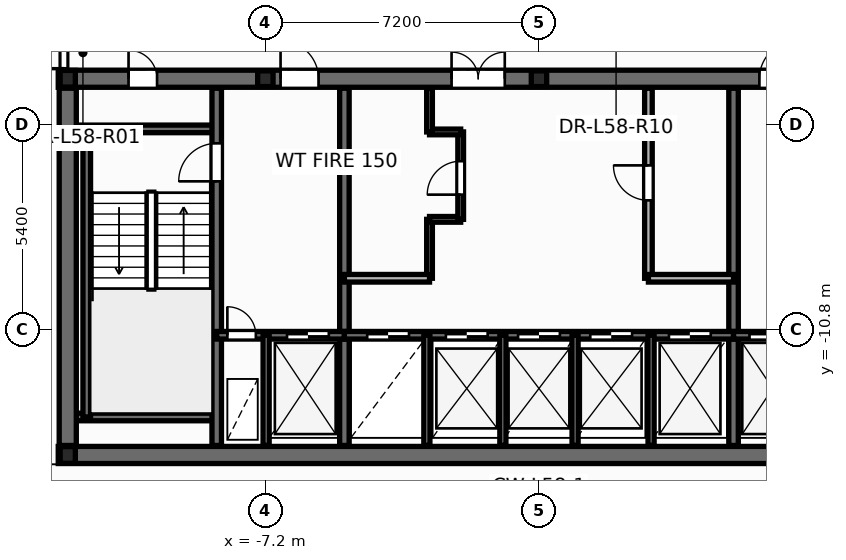
"""IFC4 building model, lengths in metres.
Left out: names, types, materials, properties, quantities, classifications, styles, units other than length and angle.
Written with IfcOpenShell. Run it as: python <this file> out.ifc"""

import sys

from ifc_helpers import new_model, si_unit, direction, frame, frame_2d, origin, origin_2d, place, context, subcontext, project, spatial, rectangle, i_section, extrude, element, fill, save


model = new_model("IFC4")
c1 = context("Model", 3, precision=1e-05, world=origin(), true_north=direction((0.0, 1.0)))
c2 = subcontext(c1, "Body", "Model", "MODEL_VIEW")
j1 = project(units=[si_unit("LENGTHUNIT", "METRE"), si_unit("PLANEANGLEUNIT", "RADIAN")], contexts=[c1])
p1 = place(None, origin())
s1 = spatial("IfcSite", under=j1, at=p1, CompositionType="ELEMENT")
p2 = place(p1, origin())
s2 = spatial("IfcBuilding", under=s1, at=p2, CompositionType="ELEMENT")
p3 = place(p2, frame((0.0, 0.0, 221.7)))
s3 = spatial("IfcBuildingStorey", under=s2, at=p3, CompositionType="ELEMENT", Elevation=221.7)
for number, where, z_axis, x_axis in (
    (1, (-12.4, -14.1, 0.0), (0.0, 0.0, 1.0), (1.0, 0.0, 0.0)),
    (2, (-12.4, -4.2, 0.0), (0.0, 0.0, 1.0), (1.0, 0.0, 0.0)),
):
    element("IfcColumn", number, at=place(p3, frame(where, z_axis=z_axis, x_axis=x_axis)), inside=s3, PredefinedType="COLUMN", context=c2, shape_type="SweptSolid", body=[
        extrude(i_section(OverallWidth=0.4, OverallDepth=0.44, WebThickness=0.028, FlangeThickness=0.04, at=origin_2d()), origin(), (0.0, 0.0, 1.0), 3.6),
    ])
for number, where, z_axis, x_axis in (
    (3, (-7.2, -4.2, 0.0), (0.0, 0.0, 1.0), (1.0, 0.0, 0.0)),
    (4, (0.0, -4.2, 0.0), (0.0, 0.0, 1.0), (1.0, 0.0, 0.0)),
):
    element("IfcColumn", number, at=place(p3, frame(where, z_axis=z_axis, x_axis=x_axis)), inside=s3, PredefinedType="PILASTER", context=c2, shape_type="SweptSolid", body=[
        extrude(i_section(OverallWidth=0.405, OverallDepth=0.414, WebThickness=0.022, FlangeThickness=0.032, at=origin_2d()), origin(), (0.0, 0.0, 1.0), 3.6),
    ])
p4 = place(p3, frame((-2.88, -9.45, 0.0), z_axis=(0.0, 0.0, 1.0), x_axis=(0.0, 1.0, 0.0)))
e5 = element("IfcWall", 5, at=p4, inside=s3, PredefinedType="PARTITIONING", context=c2, shape_type="SweptSolid", body=[
    extrude(rectangle(XDim=1.55, YDim=0.15, at=frame_2d((0.775, 0.0))), origin(), (0.0, 0.0, 1.0), 3.345),
])
p5 = place(p3, frame((-2.88, -7.9, 0.0), z_axis=(0.0, 0.0, 1.0), x_axis=(1.0, 0.0, 0.0)))
e6 = element("IfcWall", 6, at=p5, inside=s3, PredefinedType="PARTITIONING", context=c2, shape_type="SweptSolid", body=[
    extrude(rectangle(XDim=0.82, YDim=0.15, at=frame_2d((0.41, 0.0))), origin(), (0.0, 0.0, 1.0), 3.345),
])
p6 = place(p3, frame((-2.06, -7.9, 0.0), z_axis=(0.0, 0.0, 1.0), x_axis=(0.0, 1.0, 0.0)))
e7 = element("IfcWall", 7, at=p6, inside=s3, PredefinedType="PARTITIONING", context=c2, shape_type="SweptSolid", body=[
    extrude(rectangle(XDim=2.3, YDim=0.15, at=frame_2d((1.15, 0.0))), origin(), (0.0, 0.0, 1.0), 3.345),
])
p7 = place(p6, frame((0.65, 0.0, 0.0)))
e8 = element("IfcOpeningElement", 8, at=p7, cuts=e7, PredefinedType="OPENING", context=c2, shape_type="SweptSolid", body=[
    extrude(rectangle(XDim=0.886, YDim=2.104, at=frame_2d((0.44, 1.052))), frame((0.0, 0.085, 0.0), z_axis=(0.0, -1.0, 0.0), x_axis=(1.0, 0.0, 0.0)), (0.0, 0.0, 1.0), 0.17),
])
p8 = place(p3, frame((-2.88, -5.6, 0.0), z_axis=(0.0, 0.0, 1.0), x_axis=(1.0, 0.0, 0.0)))
e9 = element("IfcWall", 9, at=p8, inside=s3, PredefinedType="PARTITIONING", context=c2, shape_type="SweptSolid", body=[
    extrude(rectangle(XDim=0.82, YDim=0.15, at=frame_2d((0.41, 0.0))), origin(), (0.0, 0.0, 1.0), 3.345),
])
p9 = place(p3, frame((-2.88, -5.6, 0.0), z_axis=(0.0, 0.0, 1.0), x_axis=(0.0, 1.0, 0.0)))
e10 = element("IfcWall", 10, at=p9, inside=s3, PredefinedType="PARTITIONING", context=c2, shape_type="SweptSolid", body=[
    extrude(rectangle(XDim=1.15, YDim=0.15, at=frame_2d((0.575, 0.0))), origin(), (0.0, 0.0, 1.0), 3.345),
])
p10 = place(p3, frame((-12.65, -14.1, 0.0), z_axis=(0.0, 0.0, 1.0), x_axis=(1.0, 0.0, 0.0)))
e11 = element("IfcWall", 11, at=p10, inside=s3, PredefinedType="SHEAR", context=c2, shape_type="SweptSolid", body=[
    extrude(rectangle(XDim=25.3, YDim=0.45, at=frame_2d((12.65, 0.0))), origin(), (0.0, 0.0, 1.0), 3.6),
])
p11 = place(p3, frame((-12.65, -4.2, 0.0), z_axis=(0.0, 0.0, 1.0), x_axis=(1.0, 0.0, 0.0)))
e12 = element("IfcWall", 12, at=p11, inside=s3, PredefinedType="SHEAR", context=c2, shape_type="SweptSolid", body=[
    extrude(rectangle(XDim=25.3, YDim=0.45, at=frame_2d((12.65, 0.0))), origin(), (0.0, 0.0, 1.0), 3.6),
])
p12 = place(p11, frame((1.85, 0.0, 0.0)))
e13 = element("IfcOpeningElement", 13, at=p12, cuts=e12, PredefinedType="OPENING", context=c2, shape_type="SweptSolid", body=[
    extrude(rectangle(XDim=0.756, YDim=2.054, at=frame_2d((0.375, 1.027))), frame((0.0, 0.235, 0.0), z_axis=(0.0, -1.0, 0.0), x_axis=(1.0, 0.0, 0.0)), (0.0, 0.0, 1.0), 0.47),
])
p13 = place(p11, frame((21.85, 0.0, 0.0)))
e14 = element("IfcOpeningElement", 14, at=p13, cuts=e12, PredefinedType="OPENING", context=c2, shape_type="SweptSolid", body=[
    extrude(rectangle(XDim=0.756, YDim=2.054, at=frame_2d((0.375, 1.027))), frame((0.0, 0.235, 0.0), z_axis=(0.0, -1.0, 0.0), x_axis=(1.0, 0.0, 0.0)), (0.0, 0.0, 1.0), 0.47),
])
p14 = place(p11, frame((23.5, 0.0, 0.0)))
e15 = element("IfcOpeningElement", 15, at=p14, cuts=e12, PredefinedType="OPENING", context=c2, shape_type="SweptSolid", body=[
    extrude(rectangle(XDim=0.756, YDim=2.054, at=frame_2d((0.375, 1.027))), frame((0.0, 0.235, 0.0), z_axis=(0.0, -1.0, 0.0), x_axis=(1.0, 0.0, 0.0)), (0.0, 0.0, 1.0), 0.47),
])
p15 = place(p11, frame((5.85, 0.0, 0.0)))
e16 = element("IfcOpeningElement", 16, at=p15, cuts=e12, PredefinedType="OPENING", context=c2, shape_type="SweptSolid", body=[
    extrude(rectangle(XDim=1.006, YDim=2.104, at=frame_2d((0.5, 1.052))), frame((0.0, 0.235, 0.0), z_axis=(0.0, -1.0, 0.0), x_axis=(1.0, 0.0, 0.0)), (0.0, 0.0, 1.0), 0.47),
])
p16 = place(p11, frame((10.35, 0.0, 0.0)))
e17 = element("IfcOpeningElement", 17, at=p16, cuts=e12, PredefinedType="OPENING", context=c2, shape_type="SweptSolid", body=[
    extrude(rectangle(XDim=1.406, YDim=2.154, at=frame_2d((0.7, 1.077))), frame((0.0, 0.235, 0.0), z_axis=(0.0, -1.0, 0.0), x_axis=(1.0, 0.0, 0.0)), (0.0, 0.0, 1.0), 0.47),
])
p17 = place(p11, frame((18.45, 0.0, 0.0)))
e18 = element("IfcOpeningElement", 18, at=p17, cuts=e12, PredefinedType="OPENING", context=c2, shape_type="SweptSolid", body=[
    extrude(rectangle(XDim=1.006, YDim=2.104, at=frame_2d((0.5, 1.052))), frame((0.0, 0.235, 0.0), z_axis=(0.0, -1.0, 0.0), x_axis=(1.0, 0.0, 0.0)), (0.0, 0.0, 1.0), 0.47),
])
for number, where, z_axis, x_axis in (
    (19, (-12.35, -5.52, 0.0), (0.0, 0.0, 1.0), (1.0, 0.0, 0.0)),
    (20, (-12.35, -13.1, 0.0), (0.0, 0.0, 1.0), (1.0, 0.0, 0.0)),
):
    element("IfcWall", number, at=place(p3, frame(where, z_axis=z_axis, x_axis=x_axis)), inside=s3, PredefinedType="SOLIDWALL", context=c2, shape_type="SweptSolid", body=[
        extrude(rectangle(XDim=3.87, YDim=0.2, at=frame_2d((1.935, 0.0))), origin(), (0.0, 0.0, 1.0), 3.6),
    ])
p18 = place(p3, frame((-11.9, -13.1, 0.0), z_axis=(0.0, 0.0, 1.0), x_axis=(0.0, 1.0, 0.0)))
e21 = element("IfcWall", 21, at=p18, inside=s3, PredefinedType="SOLIDWALL", context=c2, shape_type="SweptSolid", body=[
    extrude(rectangle(XDim=7.58, YDim=0.2, at=frame_2d((3.79, 0.0))), origin(), (0.0, 0.0, 1.0), 3.6),
])
p19 = place(p3, frame((-8.48, -13.85, 0.0), z_axis=(0.0, 0.0, 1.0), x_axis=(0.0, 1.0, 0.0)))
e22 = element("IfcWall", 22, at=p19, inside=s3, PredefinedType="SHEAR", context=c2, shape_type="SweptSolid", body=[
    extrude(rectangle(XDim=9.4, YDim=0.25, at=frame_2d((4.7, 0.0))), origin(), (0.0, 0.0, 1.0), 3.6),
])
p20 = place(p19, frame((6.95, 0.0, 0.0)))
e23 = element("IfcOpeningElement", 23, at=p20, cuts=e22, PredefinedType="OPENING", context=c2, shape_type="SweptSolid", body=[
    extrude(rectangle(XDim=1.006, YDim=2.104, at=frame_2d((0.5, 1.052))), frame((0.0, 0.135, 0.0), z_axis=(0.0, -1.0, 0.0), x_axis=(1.0, 0.0, 0.0)), (0.0, 0.0, 1.0), 0.27),
])
for number, where, z_axis, x_axis in (
    (24, (-5.12, -13.85, 0.0), (0.0, 0.0, 1.0), (0.0, 1.0, 0.0)),
    (25, (5.12, -13.85, 0.0), (0.0, 0.0, 1.0), (0.0, 1.0, 0.0)),
):
    element("IfcWall", number, at=place(p3, frame(where, z_axis=z_axis, x_axis=x_axis)), inside=s3, PredefinedType="SHEAR", context=c2, shape_type="SweptSolid", body=[
        extrude(rectangle(XDim=9.4, YDim=0.25, at=frame_2d((4.7, 0.0))), origin(), (0.0, 0.0, 1.0), 3.6),
    ])
p21 = place(p3, frame((-8.48, -10.95, 0.0), z_axis=(0.0, 0.0, 1.0), x_axis=(1.0, 0.0, 0.0)))
e26 = element("IfcWall", 26, at=p21, inside=s3, PredefinedType="SOLIDWALL", context=c2, shape_type="SweptSolid", body=[
    extrude(rectangle(XDim=3.36, YDim=0.2, at=frame_2d((1.68, 0.0))), origin(), (0.0, 0.0, 1.0), 3.6),
])
p22 = place(p21, frame((0.28, 0.0, 0.0)))
e27 = element("IfcOpeningElement", 27, at=p22, cuts=e26, PredefinedType="OPENING", context=c2, shape_type="SweptSolid", body=[
    extrude(rectangle(XDim=0.756, YDim=2.054, at=frame_2d((0.375, 1.027))), frame((0.0, 0.11, 0.0), z_axis=(0.0, -1.0, 0.0), x_axis=(1.0, 0.0, 0.0)), (0.0, 0.0, 1.0), 0.22),
])
p23 = place(p21, frame((1.85, 0.0, 0.0)))
e28 = element("IfcOpeningElement", 28, at=p23, cuts=e26, PredefinedType="OPENING", context=c2, shape_type="SweptSolid", body=[
    extrude(rectangle(XDim=1.106, YDim=2.104, at=frame_2d((0.55, 1.052))), frame((0.0, 0.11, 0.0), z_axis=(0.0, -1.0, 0.0), x_axis=(1.0, 0.0, 0.0)), (0.0, 0.0, 1.0), 0.22),
])
p24 = place(p3, frame((-5.12, -10.95, 0.0), z_axis=(0.0, 0.0, 1.0), x_axis=(1.0, 0.0, 0.0)))
e29 = element("IfcWall", 29, at=p24, inside=s3, PredefinedType="SOLIDWALL", context=c2, shape_type="SweptSolid", body=[
    extrude(rectangle(XDim=10.24, YDim=0.2, at=frame_2d((5.12, 0.0))), origin(), (0.0, 0.0, 1.0), 3.6),
])
p25 = place(p24, frame((0.6, 0.0, 0.0)))
e30 = element("IfcOpeningElement", 30, at=p25, cuts=e29, PredefinedType="OPENING", context=c2, shape_type="SweptSolid", body=[
    extrude(rectangle(XDim=1.106, YDim=2.104, at=frame_2d((0.55, 1.052))), frame((0.0, 0.11, 0.0), z_axis=(0.0, -1.0, 0.0), x_axis=(1.0, 0.0, 0.0)), (0.0, 0.0, 1.0), 0.22),
])
p26 = place(p24, frame((2.67, 0.0, 0.0)))
e31 = element("IfcOpeningElement", 31, at=p26, cuts=e29, PredefinedType="OPENING", context=c2, shape_type="SweptSolid", body=[
    extrude(rectangle(XDim=1.106, YDim=2.104, at=frame_2d((0.55, 1.052))), frame((0.0, 0.11, 0.0), z_axis=(0.0, -1.0, 0.0), x_axis=(1.0, 0.0, 0.0)), (0.0, 0.0, 1.0), 0.22),
])
p27 = place(p24, frame((4.57, 0.0, 0.0)))
e32 = element("IfcOpeningElement", 32, at=p27, cuts=e29, PredefinedType="OPENING", context=c2, shape_type="SweptSolid", body=[
    extrude(rectangle(XDim=1.106, YDim=2.104, at=frame_2d((0.55, 1.052))), frame((0.0, 0.11, 0.0), z_axis=(0.0, -1.0, 0.0), x_axis=(1.0, 0.0, 0.0)), (0.0, 0.0, 1.0), 0.22),
])
p28 = place(p24, frame((6.47, 0.0, 0.0)))
e33 = element("IfcOpeningElement", 33, at=p28, cuts=e29, PredefinedType="OPENING", context=c2, shape_type="SweptSolid", body=[
    extrude(rectangle(XDim=1.106, YDim=2.104, at=frame_2d((0.55, 1.052))), frame((0.0, 0.11, 0.0), z_axis=(0.0, -1.0, 0.0), x_axis=(1.0, 0.0, 0.0)), (0.0, 0.0, 1.0), 0.22),
])
p29 = place(p24, frame((8.54, 0.0, 0.0)))
e34 = element("IfcOpeningElement", 34, at=p29, cuts=e29, PredefinedType="OPENING", context=c2, shape_type="SweptSolid", body=[
    extrude(rectangle(XDim=1.106, YDim=2.104, at=frame_2d((0.55, 1.052))), frame((0.0, 0.11, 0.0), z_axis=(0.0, -1.0, 0.0), x_axis=(1.0, 0.0, 0.0)), (0.0, 0.0, 1.0), 0.22),
])
p30 = place(p3, frame((5.12, -10.95, 0.0), z_axis=(0.0, 0.0, 1.0), x_axis=(1.0, 0.0, 0.0)))
e35 = element("IfcWall", 35, at=p30, inside=s3, PredefinedType="SOLIDWALL", context=c2, shape_type="SweptSolid", body=[
    extrude(rectangle(XDim=3.36, YDim=0.2, at=frame_2d((1.68, 0.0))), origin(), (0.0, 0.0, 1.0), 3.6),
])
p31 = place(p30, frame((0.42, 0.0, 0.0)))
e36 = element("IfcOpeningElement", 36, at=p31, cuts=e35, PredefinedType="OPENING", context=c2, shape_type="SweptSolid", body=[
    extrude(rectangle(XDim=1.106, YDim=2.104, at=frame_2d((0.55, 1.052))), frame((0.0, 0.11, 0.0), z_axis=(0.0, -1.0, 0.0), x_axis=(1.0, 0.0, 0.0)), (0.0, 0.0, 1.0), 0.22),
])
p32 = place(p30, frame((2.3, 0.0, 0.0)))
e37 = element("IfcOpeningElement", 37, at=p32, cuts=e35, PredefinedType="OPENING", context=c2, shape_type="SweptSolid", body=[
    extrude(rectangle(XDim=0.756, YDim=2.054, at=frame_2d((0.375, 1.027))), frame((0.0, 0.11, 0.0), z_axis=(0.0, -1.0, 0.0), x_axis=(1.0, 0.0, 0.0)), (0.0, 0.0, 1.0), 0.22),
])
for number, where, z_axis, x_axis in (
    (38, (-7.18, -13.85, 0.0), (0.0, 0.0, 1.0), (0.0, 1.0, 0.0)),
    (39, (-2.95, -13.85, 0.0), (0.0, 0.0, 1.0), (0.0, 1.0, 0.0)),
    (40, (2.95, -13.85, 0.0), (0.0, 0.0, 1.0), (0.0, 1.0, 0.0)),
):
    element("IfcWall", number, at=place(p3, frame(where, z_axis=z_axis, x_axis=x_axis)), inside=s3, PredefinedType="PARTITIONING", context=c2, shape_type="SweptSolid", body=[
        extrude(rectangle(XDim=2.9, YDim=0.16, at=frame_2d((1.45, 0.0))), origin(), (0.0, 0.0, 1.0), 2.47),
    ])
p33 = place(p3, frame((-12.4, -13.85, 0.0), z_axis=(0.0, 0.0, 1.0), x_axis=(0.0, 1.0, 0.0)))
e41 = element("IfcWall", 41, at=p33, inside=s3, PredefinedType="SHEAR", context=c2, shape_type="SweptSolid", body=[
    extrude(rectangle(XDim=9.4, YDim=0.45, at=frame_2d((4.7, 0.0))), origin(), (0.0, 0.0, 1.0), 3.6),
])
p34 = place(p3, frame((-5.12, -9.45, 0.0), z_axis=(0.0, 0.0, 1.0), x_axis=(1.0, 0.0, 0.0)))
e42 = element("IfcWall", 42, at=p34, inside=s3, PredefinedType="SOLIDWALL", context=c2, shape_type="SweptSolid", body=[
    extrude(rectangle(XDim=2.24, YDim=0.2, at=frame_2d((1.12, 0.0))), origin(), (0.0, 0.0, 1.0), 3.345),
])
p35 = place(p3, frame((2.88, -9.45, 0.0), z_axis=(0.0, 0.0, 1.0), x_axis=(0.0, 1.0, 0.0)))
e43 = element("IfcWall", 43, at=p35, inside=s3, PredefinedType="SOLIDWALL", context=c2, shape_type="SweptSolid", body=[
    extrude(rectangle(XDim=5.0, YDim=0.2, at=frame_2d((2.5, 0.0))), origin(), (0.0, 0.0, 1.0), 3.345),
])
p36 = place(p35, frame((2.05, 0.0, 0.0)))
e44 = element("IfcOpeningElement", 44, at=p36, cuts=e43, PredefinedType="OPENING", context=c2, shape_type="SweptSolid", body=[
    extrude(rectangle(XDim=0.926, YDim=2.104, at=frame_2d((0.46, 1.052))), frame((0.0, 0.11, 0.0), z_axis=(0.0, -1.0, 0.0), x_axis=(1.0, 0.0, 0.0)), (0.0, 0.0, 1.0), 0.22),
])
p37 = place(p3, frame((2.88, -9.45, 0.0), z_axis=(0.0, 0.0, 1.0), x_axis=(1.0, 0.0, 0.0)))
e45 = element("IfcWall", 45, at=p37, inside=s3, PredefinedType="SOLIDWALL", context=c2, shape_type="SweptSolid", body=[
    extrude(rectangle(XDim=2.24, YDim=0.2, at=frame_2d((1.12, 0.0))), origin(), (0.0, 0.0, 1.0), 3.345),
])
for number, where, z_axis, x_axis in (
    (46, (-0.95, -13.85, 0.0), (0.0, 0.0, 1.0), (0.0, 1.0, 0.0)),
    (47, (0.95, -13.85, 0.0), (0.0, 0.0, 1.0), (0.0, 1.0, 0.0)),
):
    element("IfcWall", number, at=place(p3, frame(where, z_axis=z_axis, x_axis=x_axis)), inside=s3, PredefinedType="PARTITIONING", context=c2, shape_type="SweptSolid", body=[
        extrude(rectangle(XDim=2.9, YDim=0.16, at=frame_2d((1.45, 0.0))), origin(), (0.0, 0.0, 1.0), 2.47),
    ])
p38 = place(p3, frame((-12.5, -4.24, 0.0), z_axis=(0.0, 0.0, 1.0), x_axis=(0.0, 1.0, 0.0)))
e48 = element("IfcWall", 48, at=p38, inside=s3, PredefinedType="PARTITIONING", context=c2, shape_type="SweptSolid", body=[
    extrude(rectangle(XDim=1.48, YDim=0.15, at=frame_2d((0.74, 0.0))), origin(), (0.0, 0.0, 1.0), 2.32),
])
p39 = place(p38, frame((0.315, 0.0, 0.0)))
e49 = element("IfcOpeningElement", 49, at=p39, cuts=e48, PredefinedType="OPENING", context=c2, shape_type="SweptSolid", body=[
    extrude(rectangle(XDim=0.826, YDim=2.104, at=frame_2d((0.41, 1.052))), frame((0.0, 0.085, 0.0), z_axis=(0.0, -1.0, 0.0), x_axis=(1.0, 0.0, 0.0)), (0.0, 0.0, 1.0), 0.17),
])
p40 = place(p7, origin())
e50 = element("IfcDoor", 50, at=p40, inside=s3, OperationType="SINGLE_SWING_LEFT", PredefinedType="DOOR", context=c2, shape_type="SweptSolid", body=[
    extrude(rectangle(XDim=0.88, YDim=2.1, at=frame_2d((0.44, 1.05))), frame((0.0, 0.025, 0.0), z_axis=(0.0, -1.0, 0.0), x_axis=(1.0, 0.0, 0.0)), (0.0, 0.0, 1.0), 0.05),
])
fill(e8, e50)
p41 = place(p36, origin())
e51 = element("IfcDoor", 51, at=p41, inside=s3, OperationType="SINGLE_SWING_RIGHT", PredefinedType="DOOR", context=c2, shape_type="SweptSolid", body=[
    extrude(rectangle(XDim=0.92, YDim=2.1, at=frame_2d((0.46, 1.05))), frame((0.0, 0.025, 0.0), z_axis=(0.0, -1.0, 0.0), x_axis=(1.0, 0.0, 0.0)), (0.0, 0.0, 1.0), 0.05),
])
fill(e44, e51)
p42 = place(p20, origin())
e52 = element("IfcDoor", 52, at=p42, inside=s3, OperationType="SINGLE_SWING_LEFT", PredefinedType="DOOR", context=c2, shape_type="SweptSolid", body=[
    extrude(rectangle(XDim=1.0, YDim=2.1, at=frame_2d((0.5, 1.05))), frame((0.0, 0.025, 0.0), z_axis=(0.0, -1.0, 0.0), x_axis=(1.0, 0.0, 0.0)), (0.0, 0.0, 1.0), 0.05),
])
fill(e23, e52)
p43 = place(p22, origin())
e53 = element("IfcDoor", 53, at=p43, inside=s3, OperationType="SINGLE_SWING_LEFT", PredefinedType="DOOR", context=c2, shape_type="SweptSolid", body=[
    extrude(rectangle(XDim=0.75, YDim=2.05, at=frame_2d((0.375, 1.025))), frame((0.0, 0.025, 0.0), z_axis=(0.0, -1.0, 0.0), x_axis=(1.0, 0.0, 0.0)), (0.0, 0.0, 1.0), 0.05),
])
fill(e27, e53)
p44 = place(p23, origin())
e54 = element("IfcDoor", 54, at=p44, inside=s3, OperationType="DOUBLE_DOOR_SLIDING", PredefinedType="DOOR", context=c2, shape_type="SweptSolid", body=[
    extrude(rectangle(XDim=1.1, YDim=2.1, at=frame_2d((0.55, 1.05))), frame((0.0, 0.025, 0.0), z_axis=(0.0, -1.0, 0.0), x_axis=(1.0, 0.0, 0.0)), (0.0, 0.0, 1.0), 0.05),
])
fill(e28, e54)
p45 = place(p31, origin())
e55 = element("IfcDoor", 55, at=p45, inside=s3, OperationType="DOUBLE_DOOR_SLIDING", PredefinedType="DOOR", context=c2, shape_type="SweptSolid", body=[
    extrude(rectangle(XDim=1.1, YDim=2.1, at=frame_2d((0.55, 1.05))), frame((0.0, 0.025, 0.0), z_axis=(0.0, -1.0, 0.0), x_axis=(1.0, 0.0, 0.0)), (0.0, 0.0, 1.0), 0.05),
])
fill(e36, e55)
p46 = place(p25, origin())
e56 = element("IfcDoor", 56, at=p46, inside=s3, OperationType="DOUBLE_DOOR_SLIDING", PredefinedType="DOOR", context=c2, shape_type="SweptSolid", body=[
    extrude(rectangle(XDim=1.1, YDim=2.1, at=frame_2d((0.55, 1.05))), frame((0.0, 0.025, 0.0), z_axis=(0.0, -1.0, 0.0), x_axis=(1.0, 0.0, 0.0)), (0.0, 0.0, 1.0), 0.05),
])
fill(e30, e56)
p47 = place(p26, origin())
e57 = element("IfcDoor", 57, at=p47, inside=s3, OperationType="DOUBLE_DOOR_SLIDING", PredefinedType="DOOR", context=c2, shape_type="SweptSolid", body=[
    extrude(rectangle(XDim=1.1, YDim=2.1, at=frame_2d((0.55, 1.05))), frame((0.0, 0.025, 0.0), z_axis=(0.0, -1.0, 0.0), x_axis=(1.0, 0.0, 0.0)), (0.0, 0.0, 1.0), 0.05),
])
fill(e31, e57)
p48 = place(p27, origin())
e58 = element("IfcDoor", 58, at=p48, inside=s3, OperationType="DOUBLE_DOOR_SLIDING", PredefinedType="DOOR", context=c2, shape_type="SweptSolid", body=[
    extrude(rectangle(XDim=1.1, YDim=2.1, at=frame_2d((0.55, 1.05))), frame((0.0, 0.025, 0.0), z_axis=(0.0, -1.0, 0.0), x_axis=(1.0, 0.0, 0.0)), (0.0, 0.0, 1.0), 0.05),
])
fill(e32, e58)
p49 = place(p28, origin())
e59 = element("IfcDoor", 59, at=p49, inside=s3, OperationType="DOUBLE_DOOR_SLIDING", PredefinedType="DOOR", context=c2, shape_type="SweptSolid", body=[
    extrude(rectangle(XDim=1.1, YDim=2.1, at=frame_2d((0.55, 1.05))), frame((0.0, 0.025, 0.0), z_axis=(0.0, -1.0, 0.0), x_axis=(1.0, 0.0, 0.0)), (0.0, 0.0, 1.0), 0.05),
])
fill(e33, e59)
p50 = place(p29, origin())
e60 = element("IfcDoor", 60, at=p50, inside=s3, OperationType="DOUBLE_DOOR_SLIDING", PredefinedType="DOOR", context=c2, shape_type="SweptSolid", body=[
    extrude(rectangle(XDim=1.1, YDim=2.1, at=frame_2d((0.55, 1.05))), frame((0.0, 0.025, 0.0), z_axis=(0.0, -1.0, 0.0), x_axis=(1.0, 0.0, 0.0)), (0.0, 0.0, 1.0), 0.05),
])
fill(e34, e60)
p51 = place(p12, origin())
e61 = element("IfcDoor", 61, at=p51, inside=s3, OperationType="SINGLE_SWING_LEFT", PredefinedType="DOOR", context=c2, shape_type="SweptSolid", body=[
    extrude(rectangle(XDim=0.75, YDim=2.05, at=frame_2d((0.375, 1.025))), frame((0.0, 0.025, 0.0), z_axis=(0.0, -1.0, 0.0), x_axis=(1.0, 0.0, 0.0)), (0.0, 0.0, 1.0), 0.05),
])
fill(e13, e61)
p52 = place(p15, origin())
e62 = element("IfcDoor", 62, at=p52, inside=s3, OperationType="SINGLE_SWING_LEFT", PredefinedType="DOOR", context=c2, shape_type="SweptSolid", body=[
    extrude(rectangle(XDim=1.0, YDim=2.1, at=frame_2d((0.5, 1.05))), frame((0.0, 0.025, 0.0), z_axis=(0.0, -1.0, 0.0), x_axis=(1.0, 0.0, 0.0)), (0.0, 0.0, 1.0), 0.05),
])
fill(e16, e62)
p53 = place(p16, origin())
e63 = element("IfcDoor", 63, at=p53, inside=s3, OperationType="DOUBLE_DOOR_SINGLE_SWING", PredefinedType="DOOR", context=c2, shape_type="SweptSolid", body=[
    extrude(rectangle(XDim=1.4, YDim=2.15, at=frame_2d((0.7, 1.075))), frame((0.0, 0.025, 0.0), z_axis=(0.0, -1.0, 0.0), x_axis=(1.0, 0.0, 0.0)), (0.0, 0.0, 1.0), 0.05),
])
fill(e17, e63)
p54 = place(p17, origin())
e64 = element("IfcDoor", 64, at=p54, inside=s3, OperationType="SINGLE_SWING_RIGHT", PredefinedType="DOOR", context=c2, shape_type="SweptSolid", body=[
    extrude(rectangle(XDim=1.0, YDim=2.1, at=frame_2d((0.5, 1.05))), frame((0.0, 0.025, 0.0), z_axis=(0.0, -1.0, 0.0), x_axis=(1.0, 0.0, 0.0)), (0.0, 0.0, 1.0), 0.05),
])
fill(e18, e64)
p55 = place(p39, origin())
e65 = element("IfcDoor", 65, at=p55, inside=s3, OperationType="SINGLE_SWING_LEFT", PredefinedType="DOOR", context=c2, shape_type="SweptSolid", body=[
    extrude(rectangle(XDim=0.82, YDim=2.1, at=frame_2d((0.41, 1.05))), frame((0.0, 0.025, 0.0), z_axis=(0.0, -1.0, 0.0), x_axis=(1.0, 0.0, 0.0)), (0.0, 0.0, 1.0), 0.05),
])
fill(e49, e65)
save(model, sys.argv[1])
